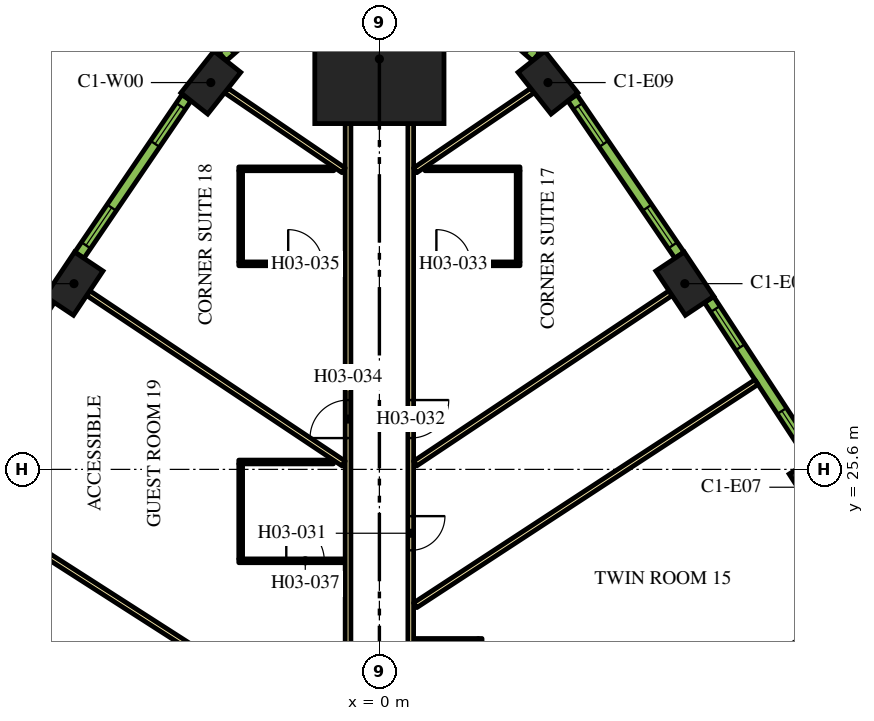
"""IFC4 building model, lengths in metres.
Left out: names, types, materials, properties, quantities, classifications, styles, units other than length and angle.
Written with IfcOpenShell. Run it as: python <this file> out.ifc"""

import sys

from ifc_helpers import new_model, si_unit, direction, frame, frame_2d, origin, origin_2d, place, context, subcontext, project, spatial, rectangle, extrude, element, fill, save


model = new_model("IFC4")
c1 = context("Model", 3, precision=1e-05, world=origin(), true_north=direction((0.0, 1.0)))
c2 = subcontext(c1, "Body", "Model", "MODEL_VIEW")
j1 = project(units=[si_unit("LENGTHUNIT", "METRE"), si_unit("PLANEANGLEUNIT", "RADIAN")], contexts=[c1])
p1 = place(None, origin())
s1 = spatial("IfcSite", under=j1, at=p1, CompositionType="ELEMENT")
p2 = place(p1, origin())
s2 = spatial("IfcBuilding", under=s1, at=p2, CompositionType="ELEMENT")
p3 = place(p2, frame((0.0, 0.0, 54.9)))
s3 = spatial("IfcBuildingStorey", under=s2, at=p3, CompositionType="ELEMENT", Elevation=54.9)
p4 = place(p3, frame((0.0, 36.399, 0.0), z_axis=(0.0, 0.0, 1.0), x_axis=(0.0, 1.0, 0.0)))
e1 = element("IfcColumn", 1, at=p4, inside=s3, PredefinedType="COLUMN", context=c2, shape_type="SweptSolid", body=[
    extrude(rectangle(XDim=3.4, YDim=3.4, at=origin_2d()), origin(), (0.0, 0.0, 1.0), 3.9),
])
for number, where, z_axis, x_axis in (
    (2, (11.539, 25.131, 0.0), (0.0, 0.0, 1.0), (-0.539, 0.842, 0.0)),
    (3, (8.037, 30.487, 0.0), (0.0, 0.0, 1.0), (-0.555, 0.832, 0.0)),
    (4, (4.436, 35.778, 0.0), (0.0, 0.0, 1.0), (-0.62, 0.784, 0.0)),
    (5, (-4.436, 35.778, 0.0), (0.0, 0.0, 1.0), (-0.62, -0.784, 0.0)),
    (6, (-8.037, 30.487, 0.0), (0.0, 0.0, 1.0), (-0.555, -0.832, 0.0)),
):
    element("IfcColumn", number, at=place(p3, frame(where, z_axis=z_axis, x_axis=x_axis)), inside=s3, PredefinedType="COLUMN", context=c2, shape_type="SweptSolid", body=[
        extrude(rectangle(XDim=1.4, YDim=0.9, at=origin_2d()), origin(), (0.0, 0.0, 1.0), 3.9),
    ])
p5 = place(p3, frame((0.825, 34.699, 0.0), z_axis=(0.0, 0.0, 1.0), x_axis=(0.0, -1.0, 0.0)))
e7 = element("IfcWall", 7, at=p5, inside=s3, PredefinedType="PARTITIONING", context=c2, shape_type="SweptSolid", body=[
    extrude(rectangle(XDim=16.144, YDim=0.15, at=frame_2d((8.072, 0.0))), origin(), (0.0, 0.0, 1.0), 2.75),
])
p6 = place(p5, frame((10.329, 0.0, 0.0)))
e8 = element("IfcOpeningElement", 8, at=p6, cuts=e7, PredefinedType="OPENING", context=c2, shape_type="SweptSolid", body=[
    extrude(rectangle(XDim=0.9, YDim=2.1, at=frame_2d((0.45, 1.05))), frame((0.0, 0.085, 0.0), z_axis=(0.0, -1.0, 0.0), x_axis=(1.0, 0.0, 0.0)), (0.0, 0.0, 1.0), 0.17),
])
p7 = place(p5, frame((7.275, 0.0, 0.0)))
e9 = element("IfcOpeningElement", 9, at=p7, cuts=e7, PredefinedType="OPENING", context=c2, shape_type="SweptSolid", body=[
    extrude(rectangle(XDim=1.0, YDim=2.1, at=frame_2d((0.5, 1.05))), frame((0.0, 0.085, 0.0), z_axis=(0.0, -1.0, 0.0), x_axis=(1.0, 0.0, 0.0)), (0.0, 0.0, 1.0), 0.17),
])
p8 = place(p3, frame((-0.825, 18.475, 0.0), z_axis=(0.0, 0.0, 1.0), x_axis=(0.0, 1.0, 0.0)))
e10 = element("IfcWall", 10, at=p8, inside=s3, PredefinedType="PARTITIONING", context=c2, shape_type="SweptSolid", body=[
    extrude(rectangle(XDim=16.224, YDim=0.15, at=frame_2d((8.112, 0.0))), origin(), (0.0, 0.0, 1.0), 2.75),
])
p9 = place(p8, frame((7.949, 0.0, 0.0)))
e11 = element("IfcOpeningElement", 11, at=p9, cuts=e10, PredefinedType="OPENING", context=c2, shape_type="SweptSolid", body=[
    extrude(rectangle(XDim=1.0, YDim=2.1, at=frame_2d((0.5, 1.05))), frame((0.0, 0.085, 0.0), z_axis=(0.0, -1.0, 0.0), x_axis=(1.0, 0.0, 0.0)), (0.0, 0.0, 1.0), 0.17),
])
p10 = place(p8, frame((0.526, 0.0, 0.0)))
e12 = element("IfcOpeningElement", 12, at=p10, cuts=e10, PredefinedType="OPENING", context=c2, shape_type="SweptSolid", body=[
    extrude(rectangle(XDim=1.1, YDim=2.1, at=frame_2d((0.55, 1.05))), frame((0.0, 0.085, 0.0), z_axis=(0.0, -1.0, 0.0), x_axis=(1.0, 0.0, 0.0)), (0.0, 0.0, 1.0), 0.17),
])
p11 = place(p3, frame((-4.028, 35.569, 0.0), z_axis=(0.0, 0.0, 1.0), x_axis=(0.826700206326, -0.56264266534, 0.0)))
e13 = element("IfcWall", 13, at=p11, inside=s3, PredefinedType="PARTITIONING", context=c2, shape_type="SweptSolid", body=[
    extrude(rectangle(XDim=3.733, YDim=0.15, at=frame_2d((1.867, 0.0))), origin(), (0.0, 0.0, 1.0), 2.75),
])
p12 = place(p3, frame((-11.16, 24.888, 0.0), z_axis=(0.0, 0.0, 1.0), x_axis=(0.84199813156, -0.539480441211, 0.0)))
e14 = element("IfcWall", 14, at=p12, inside=s3, PredefinedType="PARTITIONING", context=c2, shape_type="SweptSolid", body=[
    extrude(rectangle(XDim=11.638, YDim=0.15, at=frame_2d((5.819, 0.0))), origin(), (0.0, 0.0, 1.0), 2.75),
])
p13 = place(p3, frame((-7.662, 30.238, 0.0), z_axis=(0.0, 0.0, 1.0), x_axis=(0.831882886825, -0.554951225431, 0.0)))
e15 = element("IfcWall", 15, at=p13, inside=s3, PredefinedType="PARTITIONING", context=c2, shape_type="SweptSolid", body=[
    extrude(rectangle(XDim=8.079, YDim=0.15, at=frame_2d((4.04, 0.0))), origin(), (0.0, 0.0, 1.0), 2.75),
])
p14 = place(p3, frame((9.922, 27.896, 0.0), z_axis=(0.0, 0.0, 1.0), x_axis=(-0.836970816595, -0.547247523675, 0.0)))
e16 = element("IfcWall", 16, at=p14, inside=s3, PredefinedType="PARTITIONING", context=c2, shape_type="SweptSolid", body=[
    extrude(rectangle(XDim=10.729, YDim=0.15, at=frame_2d((5.364, 0.0))), origin(), (0.0, 0.0, 1.0), 2.75),
])
p15 = place(p3, frame((7.662, 30.238, 0.0), z_axis=(0.0, 0.0, 1.0), x_axis=(-0.831882886825, -0.554951225431, 0.0)))
e17 = element("IfcWall", 17, at=p15, inside=s3, PredefinedType="PARTITIONING", context=c2, shape_type="SweptSolid", body=[
    extrude(rectangle(XDim=8.079, YDim=0.15, at=frame_2d((4.04, 0.0))), origin(), (0.0, 0.0, 1.0), 2.75),
])
p16 = place(p3, frame((4.028, 35.569, 0.0), z_axis=(0.0, 0.0, 1.0), x_axis=(-0.826700206326, -0.56264266534, 0.0)))
e18 = element("IfcWall", 18, at=p16, inside=s3, PredefinedType="PARTITIONING", context=c2, shape_type="SweptSolid", body=[
    extrude(rectangle(XDim=3.733, YDim=0.15, at=frame_2d((1.867, 0.0))), origin(), (0.0, 0.0, 1.0), 2.75),
])
p17 = place(p3, frame((13.376, 22.506, 0.0), z_axis=(0.0, 0.0, 1.0), x_axis=(-0.846945608893, -0.531679542183, 0.0)))
e19 = element("IfcWall", 19, at=p17, inside=s3, PredefinedType="PARTITIONING", context=c2, shape_type="SweptSolid", body=[
    extrude(rectangle(XDim=8.182, YDim=0.15, at=frame_2d((4.091, 0.0))), origin(), (0.0, 0.0, 1.0), 2.75),
])
p18 = place(p3, frame((2.651, 18.55, 0.0), z_axis=(0.0, 0.0, 1.0), x_axis=(0.0, 1.0, 0.0)))
e20 = element("IfcWall", 20, at=p18, inside=s3, PredefinedType="PARTITIONING", context=c2, shape_type="SweptSolid", body=[
    extrude(rectangle(XDim=2.6, YDim=0.1, at=frame_2d((1.3, 0.0))), origin(), (0.0, 0.0, 1.0), 2.75),
])
p19 = place(p18, frame((0.6, 0.0, 0.0)))
e21 = element("IfcOpeningElement", 21, at=p19, cuts=e20, PredefinedType="OPENING", context=c2, shape_type="SweptSolid", body=[
    extrude(rectangle(XDim=0.9, YDim=2.1, at=frame_2d((0.45, 1.05))), frame((0.0, 0.06, 0.0), z_axis=(0.0, -1.0, 0.0), x_axis=(1.0, 0.0, 0.0)), (0.0, 0.0, 1.0), 0.12),
])
p20 = place(p3, frame((2.601, 21.1, 0.0), z_axis=(0.0, 0.0, 1.0), x_axis=(-1.0, 0.0, 0.0)))
e22 = element("IfcWall", 22, at=p20, inside=s3, PredefinedType="PARTITIONING", context=c2, shape_type="SweptSolid", body=[
    extrude(rectangle(XDim=1.7, YDim=0.1, at=frame_2d((0.85, 0.0))), origin(), (0.0, 0.0, 1.0), 2.75),
])
p21 = place(p3, frame((0.9, 31.009, 0.0), z_axis=(0.0, 0.0, 1.0), x_axis=(1.0, 0.0, 0.0)))
e23 = element("IfcWall", 23, at=p21, inside=s3, PredefinedType="PARTITIONING", context=c2, shape_type="SweptSolid", body=[
    extrude(rectangle(XDim=2.8, YDim=0.1, at=frame_2d((1.4, 0.0))), origin(), (0.0, 0.0, 1.0), 2.75),
])
p22 = place(p21, frame((0.6, 0.0, 0.0)))
e24 = element("IfcOpeningElement", 24, at=p22, cuts=e23, PredefinedType="OPENING", context=c2, shape_type="SweptSolid", body=[
    extrude(rectangle(XDim=0.9, YDim=2.1, at=frame_2d((0.45, 1.05))), frame((0.0, 0.06, 0.0), z_axis=(0.0, -1.0, 0.0), x_axis=(1.0, 0.0, 0.0)), (0.0, 0.0, 1.0), 0.12),
])
p23 = place(p3, frame((3.65, 31.059, 0.0), z_axis=(0.0, 0.0, 1.0), x_axis=(0.0, 1.0, 0.0)))
e25 = element("IfcWall", 25, at=p23, inside=s3, PredefinedType="PARTITIONING", context=c2, shape_type="SweptSolid", body=[
    extrude(rectangle(XDim=2.4, YDim=0.1, at=frame_2d((1.2, 0.0))), origin(), (0.0, 0.0, 1.0), 2.75),
])
p24 = place(p3, frame((1.2, 33.509, 0.0), z_axis=(0.0, 0.0, 1.0), x_axis=(1.0, 0.0, 0.0)))
e26 = element("IfcWall", 26, at=p24, inside=s3, PredefinedType="PARTITIONING", context=c2, shape_type="SweptSolid", body=[
    extrude(rectangle(XDim=2.5, YDim=0.1, at=frame_2d((1.25, 0.0))), origin(), (0.0, 0.0, 1.0), 2.75),
])
p25 = place(p3, frame((-3.7, 31.009, 0.0), z_axis=(0.0, 0.0, 1.0), x_axis=(1.0, 0.0, 0.0)))
e27 = element("IfcWall", 27, at=p25, inside=s3, PredefinedType="PARTITIONING", context=c2, shape_type="SweptSolid", body=[
    extrude(rectangle(XDim=2.8, YDim=0.1, at=frame_2d((1.4, 0.0))), origin(), (0.0, 0.0, 1.0), 2.75),
])
p26 = place(p25, frame((1.3, 0.0, 0.0)))
e28 = element("IfcOpeningElement", 28, at=p26, cuts=e27, PredefinedType="OPENING", context=c2, shape_type="SweptSolid", body=[
    extrude(rectangle(XDim=0.9, YDim=2.1, at=frame_2d((0.45, 1.05))), frame((0.0, 0.06, 0.0), z_axis=(0.0, -1.0, 0.0), x_axis=(1.0, 0.0, 0.0)), (0.0, 0.0, 1.0), 0.12),
])
p27 = place(p3, frame((-3.65, 31.059, 0.0), z_axis=(0.0, 0.0, 1.0), x_axis=(0.0, 1.0, 0.0)))
e29 = element("IfcWall", 29, at=p27, inside=s3, PredefinedType="PARTITIONING", context=c2, shape_type="SweptSolid", body=[
    extrude(rectangle(XDim=2.4, YDim=0.1, at=frame_2d((1.2, 0.0))), origin(), (0.0, 0.0, 1.0), 2.75),
])
p28 = place(p3, frame((-1.2, 33.509, 0.0), z_axis=(0.0, 0.0, 1.0), x_axis=(-1.0, 0.0, 0.0)))
e30 = element("IfcWall", 30, at=p28, inside=s3, PredefinedType="PARTITIONING", context=c2, shape_type="SweptSolid", body=[
    extrude(rectangle(XDim=2.5, YDim=0.1, at=frame_2d((1.25, 0.0))), origin(), (0.0, 0.0, 1.0), 2.75),
])
p29 = place(p3, frame((-3.7, 23.195, 0.0), z_axis=(0.0, 0.0, 1.0), x_axis=(1.0, 0.0, 0.0)))
e31 = element("IfcWall", 31, at=p29, inside=s3, PredefinedType="PARTITIONING", context=c2, shape_type="SweptSolid", body=[
    extrude(rectangle(XDim=2.8, YDim=0.1, at=frame_2d((1.4, 0.0))), origin(), (0.0, 0.0, 1.0), 2.75),
])
p30 = place(p29, frame((1.25, 0.0, 0.0)))
e32 = element("IfcOpeningElement", 32, at=p30, cuts=e31, PredefinedType="OPENING", context=c2, shape_type="SweptSolid", body=[
    extrude(rectangle(XDim=1.0, YDim=2.1, at=frame_2d((0.5, 1.05))), frame((0.0, 0.06, 0.0), z_axis=(0.0, -1.0, 0.0), x_axis=(1.0, 0.0, 0.0)), (0.0, 0.0, 1.0), 0.12),
])
p31 = place(p3, frame((-3.65, 23.245, 0.0), z_axis=(0.0, 0.0, 1.0), x_axis=(0.0, 1.0, 0.0)))
e33 = element("IfcWall", 33, at=p31, inside=s3, PredefinedType="PARTITIONING", context=c2, shape_type="SweptSolid", body=[
    extrude(rectangle(XDim=2.5, YDim=0.1, at=frame_2d((1.25, 0.0))), origin(), (0.0, 0.0, 1.0), 2.75),
])
p32 = place(p3, frame((-1.21, 25.795, 0.0), z_axis=(0.0, 0.0, 1.0), x_axis=(-1.0, 0.0, 0.0)))
e34 = element("IfcWall", 34, at=p32, inside=s3, PredefinedType="PARTITIONING", context=c2, shape_type="SweptSolid", body=[
    extrude(rectangle(XDim=2.49, YDim=0.1, at=frame_2d((1.245, 0.0))), origin(), (0.0, 0.0, 1.0), 2.75),
])
p33 = place(p3, frame((11.411, 25.884, 0.0), z_axis=(0.0, 0.0, 1.0), x_axis=(-0.547204617628, 0.836998868845, 0.0)))
e35 = element("IfcWall", 35, at=p33, inside=s3, PredefinedType="SOLIDWALL", context=c2, shape_type="SweptSolid", body=[
    extrude(rectangle(XDim=4.998, YDim=0.29, at=frame_2d((2.499, 0.0))), origin(), (0.0, 0.0, 1.0), 3.65),
])
p34 = place(p33, frame((0.297, 0.0, 0.9)))
e36 = element("IfcOpeningElement", 36, at=p34, cuts=e35, PredefinedType="OPENING", context=c2, shape_type="SweptSolid", body=[
    extrude(rectangle(XDim=1.2, YDim=2.15, at=frame_2d((0.6, 1.075))), frame((0.0, 0.155, 0.0), z_axis=(0.0, -1.0, 0.0), x_axis=(1.0, 0.0, 0.0)), (0.0, 0.0, 1.0), 0.31),
])
p35 = place(p33, frame((3.501, 0.0, 0.9)))
e37 = element("IfcOpeningElement", 37, at=p35, cuts=e35, PredefinedType="OPENING", context=c2, shape_type="SweptSolid", body=[
    extrude(rectangle(XDim=1.2, YDim=2.15, at=frame_2d((0.6, 1.075))), frame((0.0, 0.155, 0.0), z_axis=(0.0, -1.0, 0.0), x_axis=(1.0, 0.0, 0.0)), (0.0, 0.0, 1.0), 0.31),
])
p36 = place(p3, frame((7.895, 31.238, 0.0), z_axis=(0.0, 0.0, 1.0), x_axis=(-0.562610153679, 0.826722332454, 0.0)))
e38 = element("IfcWall", 38, at=p36, inside=s3, PredefinedType="SOLIDWALL", context=c2, shape_type="SweptSolid", body=[
    extrude(rectangle(XDim=5.006, YDim=0.29, at=frame_2d((2.503, 0.0))), origin(), (0.0, 0.0, 1.0), 3.65),
])
p37 = place(p36, frame((0.31, 0.0, 0.9)))
e39 = element("IfcOpeningElement", 39, at=p37, cuts=e38, PredefinedType="OPENING", context=c2, shape_type="SweptSolid", body=[
    extrude(rectangle(XDim=1.2, YDim=2.15, at=frame_2d((0.6, 1.075))), frame((0.0, 0.155, 0.0), z_axis=(0.0, -1.0, 0.0), x_axis=(1.0, 0.0, 0.0)), (0.0, 0.0, 1.0), 0.31),
])
p38 = place(p36, frame((3.541, 0.0, 0.9)))
e40 = element("IfcOpeningElement", 40, at=p38, cuts=e38, PredefinedType="OPENING", context=c2, shape_type="SweptSolid", body=[
    extrude(rectangle(XDim=1.2, YDim=2.15, at=frame_2d((0.6, 1.075))), frame((0.0, 0.155, 0.0), z_axis=(0.0, -1.0, 0.0), x_axis=(1.0, 0.0, 0.0)), (0.0, 0.0, 1.0), 0.31),
])
p39 = place(p3, frame((4.125, 36.459, 0.0), z_axis=(0.0, 0.0, 1.0), x_axis=(-0.749812680302, 0.661650167731, 0.0)))
e41 = element("IfcWall", 41, at=p39, inside=s3, PredefinedType="SOLIDWALL", context=c2, shape_type="SweptSolid", body=[
    extrude(rectangle(XDim=1.415, YDim=0.29, at=frame_2d((0.708, 0.0))), origin(), (0.0, 0.0, 1.0), 3.65),
])
p40 = place(p39, frame((0.258, 0.0, 0.9)))
e42 = element("IfcOpeningElement", 42, at=p40, cuts=e41, PredefinedType="OPENING", context=c2, shape_type="SweptSolid", body=[
    extrude(rectangle(XDim=0.9, YDim=2.15, at=frame_2d((0.45, 1.075))), frame((0.0, 0.155, 0.0), z_axis=(0.0, -1.0, 0.0), x_axis=(1.0, 0.0, 0.0)), (0.0, 0.0, 1.0), 0.31),
])
p41 = place(p3, frame((-3.064, 37.395, 0.0), z_axis=(0.0, 0.0, 1.0), x_axis=(-0.749812680302, -0.661650167731, 0.0)))
e43 = element("IfcWall", 43, at=p41, inside=s3, PredefinedType="SOLIDWALL", context=c2, shape_type="SweptSolid", body=[
    extrude(rectangle(XDim=1.415, YDim=0.29, at=frame_2d((0.708, 0.0))), origin(), (0.0, 0.0, 1.0), 3.65),
])
p42 = place(p41, frame((0.258, 0.0, 0.9)))
e44 = element("IfcOpeningElement", 44, at=p42, cuts=e43, PredefinedType="OPENING", context=c2, shape_type="SweptSolid", body=[
    extrude(rectangle(XDim=0.9, YDim=2.15, at=frame_2d((0.45, 1.075))), frame((0.0, 0.155, 0.0), z_axis=(0.0, -1.0, 0.0), x_axis=(1.0, 0.0, 0.0)), (0.0, 0.0, 1.0), 0.31),
])
p43 = place(p3, frame((-5.078, 35.376, 0.0), z_axis=(0.0, 0.0, 1.0), x_axis=(-0.562610153679, -0.826722332454, 0.0)))
e45 = element("IfcWall", 45, at=p43, inside=s3, PredefinedType="SOLIDWALL", context=c2, shape_type="SweptSolid", body=[
    extrude(rectangle(XDim=5.006, YDim=0.29, at=frame_2d((2.503, 0.0))), origin(), (0.0, 0.0, 1.0), 3.65),
])
p44 = place(p43, frame((0.265, 0.0, 0.9)))
e46 = element("IfcOpeningElement", 46, at=p44, cuts=e45, PredefinedType="OPENING", context=c2, shape_type="SweptSolid", body=[
    extrude(rectangle(XDim=1.2, YDim=2.15, at=frame_2d((0.6, 1.075))), frame((0.0, 0.155, 0.0), z_axis=(0.0, -1.0, 0.0), x_axis=(1.0, 0.0, 0.0)), (0.0, 0.0, 1.0), 0.31),
])
p45 = place(p43, frame((3.495, 0.0, 0.9)))
e47 = element("IfcOpeningElement", 47, at=p45, cuts=e45, PredefinedType="OPENING", context=c2, shape_type="SweptSolid", body=[
    extrude(rectangle(XDim=1.2, YDim=2.15, at=frame_2d((0.6, 1.075))), frame((0.0, 0.155, 0.0), z_axis=(0.0, -1.0, 0.0), x_axis=(1.0, 0.0, 0.0)), (0.0, 0.0, 1.0), 0.31),
])
p46 = place(p3, frame((-8.676, 30.068, 0.0), z_axis=(0.0, 0.0, 1.0), x_axis=(-0.547204617628, -0.836998868845, 0.0)))
e48 = element("IfcWall", 48, at=p46, inside=s3, PredefinedType="SOLIDWALL", context=c2, shape_type="SweptSolid", body=[
    extrude(rectangle(XDim=4.998, YDim=0.29, at=frame_2d((2.499, 0.0))), origin(), (0.0, 0.0, 1.0), 3.65),
])
p47 = place(p46, frame((0.297, 0.0, 0.9)))
e49 = element("IfcOpeningElement", 49, at=p47, cuts=e48, PredefinedType="OPENING", context=c2, shape_type="SweptSolid", body=[
    extrude(rectangle(XDim=1.2, YDim=2.15, at=frame_2d((0.6, 1.075))), frame((0.0, 0.155, 0.0), z_axis=(0.0, -1.0, 0.0), x_axis=(1.0, 0.0, 0.0)), (0.0, 0.0, 1.0), 0.31),
])
p48 = place(p46, frame((3.501, 0.0, 0.9)))
e50 = element("IfcOpeningElement", 50, at=p48, cuts=e48, PredefinedType="OPENING", context=c2, shape_type="SweptSolid", body=[
    extrude(rectangle(XDim=1.2, YDim=2.15, at=frame_2d((0.6, 1.075))), frame((0.0, 0.155, 0.0), z_axis=(0.0, -1.0, 0.0), x_axis=(1.0, 0.0, 0.0)), (0.0, 0.0, 1.0), 0.31),
])
p49 = place(p6, origin())
e51 = element("IfcDoor", 51, at=p49, inside=s3, OperationType="SINGLE_SWING_RIGHT", PredefinedType="DOOR", context=c2, shape_type="SweptSolid", body=[
    extrude(rectangle(XDim=0.9, YDim=2.1, at=frame_2d((0.45, 1.05))), frame((0.0, 0.025, 0.0), z_axis=(0.0, -1.0, 0.0), x_axis=(1.0, 0.0, 0.0)), (0.0, 0.0, 1.0), 0.05),
])
fill(e8, e51)
p50 = place(p7, origin())
e52 = element("IfcDoor", 52, at=p50, inside=s3, OperationType="SINGLE_SWING_RIGHT", PredefinedType="DOOR", context=c2, shape_type="SweptSolid", body=[
    extrude(rectangle(XDim=1.0, YDim=2.1, at=frame_2d((0.5, 1.05))), frame((0.0, 0.025, 0.0), z_axis=(0.0, -1.0, 0.0), x_axis=(1.0, 0.0, 0.0)), (0.0, 0.0, 1.0), 0.05),
])
fill(e9, e52)
p51 = place(p22, origin())
e53 = element("IfcDoor", 53, at=p51, inside=s3, OperationType="SINGLE_SWING_LEFT", PredefinedType="DOOR", context=c2, shape_type="SweptSolid", body=[
    extrude(rectangle(XDim=0.9, YDim=2.1, at=frame_2d((0.45, 1.05))), frame((0.0, 0.025, 0.0), z_axis=(0.0, -1.0, 0.0), x_axis=(1.0, 0.0, 0.0)), (0.0, 0.0, 1.0), 0.05),
])
fill(e24, e53)
p52 = place(p9, origin())
e54 = element("IfcDoor", 54, at=p52, inside=s3, OperationType="SINGLE_SWING_LEFT", PredefinedType="DOOR", context=c2, shape_type="SweptSolid", body=[
    extrude(rectangle(XDim=1.0, YDim=2.1, at=frame_2d((0.5, 1.05))), frame((0.0, 0.025, 0.0), z_axis=(0.0, -1.0, 0.0), x_axis=(1.0, 0.0, 0.0)), (0.0, 0.0, 1.0), 0.05),
])
fill(e11, e54)
p53 = place(p26, origin())
e55 = element("IfcDoor", 55, at=p53, inside=s3, OperationType="SINGLE_SWING_RIGHT", PredefinedType="DOOR", context=c2, shape_type="SweptSolid", body=[
    extrude(rectangle(XDim=0.9, YDim=2.1, at=frame_2d((0.45, 1.05))), frame((0.0, 0.025, 0.0), z_axis=(0.0, -1.0, 0.0), x_axis=(1.0, 0.0, 0.0)), (0.0, 0.0, 1.0), 0.05),
])
fill(e28, e55)
p54 = place(p30, origin())
e56 = element("IfcDoor", 56, at=p54, inside=s3, OperationType="SINGLE_SWING_LEFT", PredefinedType="DOOR", context=c2, shape_type="SweptSolid", body=[
    extrude(rectangle(XDim=1.0, YDim=2.1, at=frame_2d((0.5, 1.05))), frame((0.0, 0.025, 0.0), z_axis=(0.0, -1.0, 0.0), x_axis=(1.0, 0.0, 0.0)), (0.0, 0.0, 1.0), 0.05),
])
fill(e32, e56)
p55 = place(p34, origin())
e57 = element("IfcWindow", 57, at=p55, inside=s3, PartitioningType="DOUBLE_PANEL_VERTICAL", PredefinedType="WINDOW", context=c2, shape_type="SweptSolid", body=[
    extrude(rectangle(XDim=1.2, YDim=2.15, at=frame_2d((0.6, 1.075))), frame((0.0, 0.015, 0.0), z_axis=(0.0, -1.0, 0.0), x_axis=(1.0, 0.0, 0.0)), (0.0, 0.0, 1.0), 0.06),
])
fill(e36, e57)
p56 = place(p35, origin())
e58 = element("IfcWindow", 58, at=p56, inside=s3, PartitioningType="DOUBLE_PANEL_VERTICAL", PredefinedType="WINDOW", context=c2, shape_type="SweptSolid", body=[
    extrude(rectangle(XDim=1.2, YDim=2.15, at=frame_2d((0.6, 1.075))), frame((0.0, 0.015, 0.0), z_axis=(0.0, -1.0, 0.0), x_axis=(1.0, 0.0, 0.0)), (0.0, 0.0, 1.0), 0.06),
])
fill(e37, e58)
p57 = place(p37, origin())
e59 = element("IfcWindow", 59, at=p57, inside=s3, PartitioningType="DOUBLE_PANEL_VERTICAL", PredefinedType="WINDOW", context=c2, shape_type="SweptSolid", body=[
    extrude(rectangle(XDim=1.2, YDim=2.15, at=frame_2d((0.6, 1.075))), frame((0.0, 0.015, 0.0), z_axis=(0.0, -1.0, 0.0), x_axis=(1.0, 0.0, 0.0)), (0.0, 0.0, 1.0), 0.06),
])
fill(e39, e59)
p58 = place(p38, origin())
e60 = element("IfcWindow", 60, at=p58, inside=s3, PartitioningType="DOUBLE_PANEL_VERTICAL", PredefinedType="WINDOW", context=c2, shape_type="SweptSolid", body=[
    extrude(rectangle(XDim=1.2, YDim=2.15, at=frame_2d((0.6, 1.075))), frame((0.0, 0.015, 0.0), z_axis=(0.0, -1.0, 0.0), x_axis=(1.0, 0.0, 0.0)), (0.0, 0.0, 1.0), 0.06),
])
fill(e40, e60)
p59 = place(p44, origin())
e61 = element("IfcWindow", 61, at=p59, inside=s3, PartitioningType="DOUBLE_PANEL_VERTICAL", PredefinedType="WINDOW", context=c2, shape_type="SweptSolid", body=[
    extrude(rectangle(XDim=1.2, YDim=2.15, at=frame_2d((0.6, 1.075))), frame((0.0, 0.015, 0.0), z_axis=(0.0, -1.0, 0.0), x_axis=(1.0, 0.0, 0.0)), (0.0, 0.0, 1.0), 0.06),
])
fill(e46, e61)
p60 = place(p45, origin())
e62 = element("IfcWindow", 62, at=p60, inside=s3, PartitioningType="DOUBLE_PANEL_VERTICAL", PredefinedType="WINDOW", context=c2, shape_type="SweptSolid", body=[
    extrude(rectangle(XDim=1.2, YDim=2.15, at=frame_2d((0.6, 1.075))), frame((0.0, 0.015, 0.0), z_axis=(0.0, -1.0, 0.0), x_axis=(1.0, 0.0, 0.0)), (0.0, 0.0, 1.0), 0.06),
])
fill(e47, e62)
save(model, sys.argv[1])
